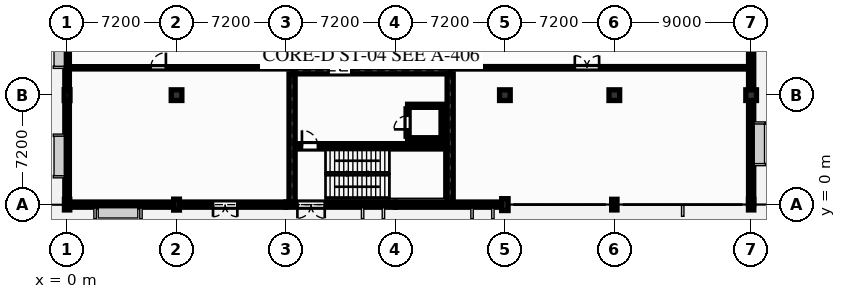
"""IFC4 building model, lengths in metres.
Left out: names, types, materials, properties, quantities, classifications, styles, units other than length and angle.
Written with IfcOpenShell. Run it as: python <this file> out.ifc"""

import sys

from ifc_helpers import new_model, si_unit, direction, frame, frame_2d, origin, origin_with_axes, origin_2d, place, context, subcontext, project, spatial, rectangle, extrude, element, fill, save


model = new_model("IFC4")
c1 = context("Model", 3, precision=1e-05, world=origin(), true_north=direction((0.0, 1.0)))
c2 = subcontext(c1, "Body", "Model", "MODEL_VIEW")
j1 = project(units=[si_unit("LENGTHUNIT", "METRE"), si_unit("PLANEANGLEUNIT", "RADIAN")], contexts=[c1])
p1 = place(None, origin())
s1 = spatial("IfcSite", under=j1, at=p1, CompositionType="ELEMENT")
p2 = place(p1, origin())
s2 = spatial("IfcBuilding", under=s1, at=p2, CompositionType="ELEMENT")
p3 = place(p2, origin())
s3 = spatial("IfcBuildingStorey", under=s2, at=p3, CompositionType="ELEMENT", Elevation=0.0)
p4 = place(p3, frame((0.0, 0.0, 0.0), z_axis=(0.0, 0.0, 1.0), x_axis=(0.0, 1.0, 0.0)))
e1 = element("IfcColumn", 1, at=p4, inside=s3, PredefinedType="PILASTER", context=c2, shape_type="SweptSolid", body=[
    extrude(rectangle(XDim=0.35, YDim=0.7, at=origin_2d()), origin(), (0.0, 0.0, 1.0), 5.1),
])
for number, where, z_axis, x_axis in (
    (2, (0.0, 7.2, 0.0), (0.0, 0.0, 1.0), (1.0, 0.0, 0.0)),
    (3, (7.2, 0.0, 0.0), (0.0, 0.0, 1.0), (0.0, 1.0, 0.0)),
):
    element("IfcColumn", number, at=place(p3, frame(where, z_axis=z_axis, x_axis=x_axis)), inside=s3, PredefinedType="PILASTER", context=c2, shape_type="SweptSolid", body=[
        extrude(rectangle(XDim=0.38, YDim=0.72, at=origin_2d()), origin(), (0.0, 0.0, 1.0), 5.1),
    ])
p5 = place(p3, frame((7.2, 7.2, 0.0), z_axis=(0.0, 0.0, 1.0), x_axis=(1.0, 0.0, 0.0)))
e4 = element("IfcColumn", 4, at=p5, inside=s3, PredefinedType="COLUMN", context=c2, shape_type="SweptSolid", body=[
    extrude(rectangle(XDim=0.7, YDim=0.7, at=origin_2d()), origin(), (0.0, 0.0, 1.0), 5.1),
])
p6 = place(p3, frame((28.8, 0.0, 0.0), z_axis=(0.0, 0.0, 1.0), x_axis=(0.0, 1.0, 0.0)))
e5 = element("IfcColumn", 5, at=p6, inside=s3, PredefinedType="PILASTER", context=c2, shape_type="SweptSolid", body=[
    extrude(rectangle(XDim=0.42, YDim=0.78, at=origin_2d()), origin(), (0.0, 0.0, 1.0), 5.1),
])
p7 = place(p3, frame((28.8, 7.2, 0.0), z_axis=(0.0, 0.0, 1.0), x_axis=(1.0, 0.0, 0.0)))
e6 = element("IfcColumn", 6, at=p7, inside=s3, PredefinedType="COLUMN", context=c2, shape_type="SweptSolid", body=[
    extrude(rectangle(XDim=0.7, YDim=0.7, at=origin_2d()), origin(), (0.0, 0.0, 1.0), 5.1),
])
p8 = place(p3, frame((36.0, 0.0, 0.0), z_axis=(0.0, 0.0, 1.0), x_axis=(0.0, 1.0, 0.0)))
e7 = element("IfcColumn", 7, at=p8, inside=s3, PredefinedType="PILASTER", context=c2, shape_type="SweptSolid", body=[
    extrude(rectangle(XDim=0.35, YDim=0.7, at=origin_2d()), origin(), (0.0, 0.0, 1.0), 5.1),
])
p9 = place(p3, frame((36.0, 7.2, 0.0), z_axis=(0.0, 0.0, 1.0), x_axis=(1.0, 0.0, 0.0)))
e8 = element("IfcColumn", 8, at=p9, inside=s3, PredefinedType="COLUMN", context=c2, shape_type="SweptSolid", body=[
    extrude(rectangle(XDim=0.7, YDim=0.7, at=origin_2d()), origin(), (0.0, 0.0, 1.0), 5.1),
])
p10 = place(p3, frame((45.0, 0.0, 0.0), z_axis=(0.0, 0.0, 1.0), x_axis=(0.0, 1.0, 0.0)))
e9 = element("IfcColumn", 9, at=p10, inside=s3, PredefinedType="PILASTER", context=c2, shape_type="SweptSolid", body=[
    extrude(rectangle(XDim=0.35, YDim=0.7, at=origin_2d()), origin(), (0.0, 0.0, 1.0), 5.1),
])
p11 = place(p3, frame((45.0, 7.2, 0.0), z_axis=(0.0, 0.0, 1.0), x_axis=(1.0, 0.0, 0.0)))
e10 = element("IfcColumn", 10, at=p11, inside=s3, PredefinedType="COLUMN", context=c2, shape_type="SweptSolid", body=[
    extrude(rectangle(XDim=0.7, YDim=0.7, at=origin_2d()), origin(), (0.0, 0.0, 1.0), 5.1),
])
p12 = place(p3, origin_with_axes())
e11 = element("IfcWall", 11, at=p12, inside=s3, PredefinedType="SOLIDWALL", context=c2, shape_type="SweptSolid", body=[
    extrude(rectangle(XDim=7.2, YDim=0.34, at=frame_2d((3.6, 0.0))), origin(), (0.0, 0.0, 1.0), 4.8),
])
p13 = place(p12, frame((2.0, 0.0, 0.85)))
e12 = element("IfcOpeningElement", 12, at=p13, cuts=e11, PredefinedType="OPENING", context=c2, shape_type="SweptSolid", body=[
    extrude(rectangle(XDim=2.7, YDim=2.6, at=frame_2d((1.35, 1.3))), frame((0.0, 0.18, 0.0), z_axis=(0.0, -1.0, 0.0), x_axis=(1.0, 0.0, 0.0)), (0.0, 0.0, 1.0), 0.36),
])
p14 = place(p3, frame((7.2, 0.0, 0.0), z_axis=(0.0, 0.0, 1.0), x_axis=(1.0, 0.0, 0.0)))
e13 = element("IfcWall", 13, at=p14, inside=s3, PredefinedType="SOLIDWALL", context=c2, shape_type="SweptSolid", body=[
    extrude(rectangle(XDim=7.2, YDim=0.34, at=frame_2d((3.6, 0.0))), origin(), (0.0, 0.0, 1.0), 4.8),
])
p15 = place(p14, frame((2.4, 0.0, 0.0)))
e14 = element("IfcOpeningElement", 14, at=p15, cuts=e13, PredefinedType="OPENING", context=c2, shape_type="SweptSolid", body=[
    extrude(rectangle(XDim=1.6, YDim=2.4, at=frame_2d((0.8, 1.2))), frame((0.0, 0.18, 0.0), z_axis=(0.0, -1.0, 0.0), x_axis=(1.0, 0.0, 0.0)), (0.0, 0.0, 1.0), 0.36),
])
p16 = place(p3, frame((14.4, 0.0, 0.0), z_axis=(0.0, 0.0, 1.0), x_axis=(1.0, 0.0, 0.0)))
e15 = element("IfcWall", 15, at=p16, inside=s3, PredefinedType="SOLIDWALL", context=c2, shape_type="SweptSolid", body=[
    extrude(rectangle(XDim=7.2, YDim=0.34, at=frame_2d((3.6, 0.0))), origin(), (0.0, 0.0, 1.0), 4.8),
])
p17 = place(p16, frame((0.75, 0.0, 0.0)))
e16 = element("IfcOpeningElement", 16, at=p17, cuts=e15, PredefinedType="OPENING", context=c2, shape_type="SweptSolid", body=[
    extrude(rectangle(XDim=1.8, YDim=2.4, at=frame_2d((0.9, 1.2))), frame((0.0, 0.18, 0.0), z_axis=(0.0, -1.0, 0.0), x_axis=(1.0, 0.0, 0.0)), (0.0, 0.0, 1.0), 0.36),
])
p18 = place(p16, frame((5.2, 0.0, 1.05)))
e17 = element("IfcOpeningElement", 17, at=p18, cuts=e15, PredefinedType="OPENING", context=c2, shape_type="SweptSolid", body=[
    extrude(rectangle(XDim=1.05, YDim=1.75, at=frame_2d((0.525, 0.875))), frame((0.0, 0.18, 0.0), z_axis=(0.0, -1.0, 0.0), x_axis=(1.0, 0.0, 0.0)), (0.0, 0.0, 1.0), 0.36),
])
p19 = place(p3, frame((21.6, 0.0, 0.0), z_axis=(0.0, 0.0, 1.0), x_axis=(1.0, 0.0, 0.0)))
e18 = element("IfcWall", 18, at=p19, inside=s3, PredefinedType="SOLIDWALL", context=c2, shape_type="SweptSolid", body=[
    extrude(rectangle(XDim=7.2, YDim=0.34, at=frame_2d((3.6, 0.0))), origin(), (0.0, 0.0, 1.0), 4.8),
])
p20 = place(p19, frame((5.2, 0.0, 1.05)))
e19 = element("IfcOpeningElement", 19, at=p20, cuts=e18, PredefinedType="OPENING", context=c2, shape_type="SweptSolid", body=[
    extrude(rectangle(XDim=1.05, YDim=1.75, at=frame_2d((0.525, 0.875))), frame((0.0, 0.18, 0.0), z_axis=(0.0, -1.0, 0.0), x_axis=(1.0, 0.0, 0.0)), (0.0, 0.0, 1.0), 0.36),
])
p21 = place(p3, frame((0.0, 0.0, 0.0), z_axis=(0.0, 0.0, 1.0), x_axis=(0.0, 1.0, 0.0)))
e20 = element("IfcWall", 20, at=p21, inside=s3, PredefinedType="SOLIDWALL", context=c2, shape_type="SweptSolid", body=[
    extrude(rectangle(XDim=7.2, YDim=0.3, at=frame_2d((3.6, 0.0))), origin(), (0.0, 0.0, 1.0), 4.115),
])
p22 = place(p21, frame((2.0, 0.0, 0.9)))
e21 = element("IfcOpeningElement", 21, at=p22, cuts=e20, PredefinedType="OPENING", context=c2, shape_type="SweptSolid", body=[
    extrude(rectangle(XDim=2.4, YDim=2.4, at=frame_2d((1.2, 1.2))), frame((0.0, 0.16, 0.0), z_axis=(0.0, -1.0, 0.0), x_axis=(1.0, 0.0, 0.0)), (0.0, 0.0, 1.0), 0.32),
])
p23 = place(p3, frame((0.0, 7.2, 0.0), z_axis=(0.0, 0.0, 1.0), x_axis=(0.0, 1.0, 0.0)))
e22 = element("IfcWall", 22, at=p23, inside=s3, PredefinedType="SOLIDWALL", context=c2, shape_type="SweptSolid", body=[
    extrude(rectangle(XDim=7.2, YDim=0.3, at=frame_2d((3.6, 0.0))), origin(), (0.0, 0.0, 1.0), 4.115),
])
p24 = place(p23, frame((4.2, 0.0, 0.9)))
e23 = element("IfcOpeningElement", 23, at=p24, cuts=e22, PredefinedType="OPENING", context=c2, shape_type="SweptSolid", body=[
    extrude(rectangle(XDim=2.4, YDim=2.4, at=frame_2d((1.2, 1.2))), frame((0.0, 0.16, 0.0), z_axis=(0.0, -1.0, 0.0), x_axis=(1.0, 0.0, 0.0)), (0.0, 0.0, 1.0), 0.32),
])
p25 = place(p3, frame((45.0, 0.0, 0.0), z_axis=(0.0, 0.0, 1.0), x_axis=(0.0, 1.0, 0.0)))
e24 = element("IfcWall", 24, at=p25, inside=s3, PredefinedType="SOLIDWALL", context=c2, shape_type="SweptSolid", body=[
    extrude(rectangle(XDim=28.8, YDim=0.34, at=frame_2d((14.4, 0.0))), origin(), (0.0, 0.0, 1.0), 4.8),
])
p26 = place(p25, frame((18.5, 0.0, 0.0)))
e25 = element("IfcOpeningElement", 25, at=p26, cuts=e24, PredefinedType="OPENING", context=c2, shape_type="SweptSolid", body=[
    extrude(rectangle(XDim=1.6, YDim=2.4, at=frame_2d((0.8, 1.2))), frame((0.0, 0.18, 0.0), z_axis=(0.0, -1.0, 0.0), x_axis=(1.0, 0.0, 0.0)), (0.0, 0.0, 1.0), 0.36),
])
p27 = place(p25, frame((2.8, 0.0, 0.9)))
e26 = element("IfcOpeningElement", 26, at=p27, cuts=e24, PredefinedType="OPENING", context=c2, shape_type="SweptSolid", body=[
    extrude(rectangle(XDim=2.4, YDim=2.4, at=frame_2d((1.2, 1.2))), frame((0.0, 0.18, 0.0), z_axis=(0.0, -1.0, 0.0), x_axis=(1.0, 0.0, 0.0)), (0.0, 0.0, 1.0), 0.36),
])
p28 = place(p25, frame((15.2, 0.0, 0.9)))
e27 = element("IfcOpeningElement", 27, at=p28, cuts=e24, PredefinedType="OPENING", context=c2, shape_type="SweptSolid", body=[
    extrude(rectangle(XDim=1.6, YDim=2.05, at=frame_2d((0.8, 1.025))), frame((0.0, 0.18, 0.0), z_axis=(0.0, -1.0, 0.0), x_axis=(1.0, 0.0, 0.0)), (0.0, 0.0, 1.0), 0.36),
])
p29 = place(p3, frame((14.8, 8.8, 0.0), z_axis=(0.0, 0.0, 1.0), x_axis=(1.0, 0.0, 0.0)))
e28 = element("IfcWall", 28, at=p29, inside=s3, PredefinedType="SHEAR", context=c2, shape_type="SweptSolid", body=[
    extrude(rectangle(XDim=10.4, YDim=0.4, at=frame_2d((5.2, 0.0))), origin(), (0.0, 0.0, 1.0), 4.8),
])
p30 = place(p29, frame((2.4, 0.0, 0.0)))
e29 = element("IfcOpeningElement", 29, at=p30, cuts=e28, PredefinedType="OPENING", context=c2, shape_type="SweptSolid", body=[
    extrude(rectangle(XDim=1.5, YDim=2.2, at=frame_2d((0.75, 1.1))), frame((0.0, 0.21, 0.0), z_axis=(0.0, -1.0, 0.0), x_axis=(1.0, 0.0, 0.0)), (0.0, 0.0, 1.0), 0.42),
])
for number, where, z_axis, x_axis in (
    (30, (14.8, 0.17, 0.0), (0.0, 0.0, 1.0), (0.0, 1.0, 0.0)),
    (31, (25.2, 0.17, 0.0), (0.0, 0.0, 1.0), (0.0, 1.0, 0.0)),
):
    element("IfcWall", number, at=place(p3, frame(where, z_axis=z_axis, x_axis=x_axis)), inside=s3, PredefinedType="SHEAR", context=c2, shape_type="SweptSolid", body=[
        extrude(rectangle(XDim=8.43, YDim=0.4, at=frame_2d((4.215, 0.0))), origin(), (0.0, 0.0, 1.0), 4.8),
    ])
p31 = place(p3, frame((15.0, 3.835, 0.0), z_axis=(0.0, 0.0, 1.0), x_axis=(1.0, 0.0, 0.0)))
e32 = element("IfcWall", 32, at=p31, inside=s3, PredefinedType="SHEAR", context=c2, shape_type="SweptSolid", body=[
    extrude(rectangle(XDim=10.0, YDim=0.35, at=frame_2d((5.0, 0.0))), origin(), (0.0, 0.0, 1.0), 4.8),
])
p32 = place(p31, frame((0.45, 0.0, 0.0)))
e33 = element("IfcOpeningElement", 33, at=p32, cuts=e32, PredefinedType="OPENING", context=c2, shape_type="SweptSolid", body=[
    extrude(rectangle(XDim=1.05, YDim=2.2, at=frame_2d((0.525, 1.1))), frame((0.0, 0.185, 0.0), z_axis=(0.0, -1.0, 0.0), x_axis=(1.0, 0.0, 0.0)), (0.0, 0.0, 1.0), 0.37),
])
for number, where, z_axis, x_axis in (
    (34, (22.4, 4.3, 0.0), (0.0, 0.0, 1.0), (1.0, 0.0, 0.0)),
    (35, (22.4, 6.5, 0.0), (0.0, 0.0, 1.0), (1.0, 0.0, 0.0)),
):
    element("IfcWall", number, at=place(p3, frame(where, z_axis=z_axis, x_axis=x_axis)), inside=s3, PredefinedType="PARTITIONING", context=c2, shape_type="SweptSolid", body=[
        extrude(rectangle(XDim=2.3, YDim=0.2, at=frame_2d((1.15, 0.0))), origin(), (0.0, 0.0, 1.0), 4.8),
    ])
p33 = place(p3, frame((22.4, 4.5, 0.0), z_axis=(0.0, 0.0, 1.0), x_axis=(0.0, 1.0, 0.0)))
e36 = element("IfcWall", 36, at=p33, inside=s3, PredefinedType="PARTITIONING", context=c2, shape_type="SweptSolid", body=[
    extrude(rectangle(XDim=1.8, YDim=0.2, at=frame_2d((0.9, 0.0))), origin(), (0.0, 0.0, 1.0), 4.8),
])
p34 = place(p33, frame((0.45, 0.0, 0.0)))
e37 = element("IfcOpeningElement", 37, at=p34, cuts=e36, PredefinedType="OPENING", context=c2, shape_type="SweptSolid", body=[
    extrude(rectangle(XDim=0.9, YDim=2.1, at=frame_2d((0.45, 1.05))), frame((0.0, 0.11, 0.0), z_axis=(0.0, -1.0, 0.0), x_axis=(1.0, 0.0, 0.0)), (0.0, 0.0, 1.0), 0.22),
])
p35 = place(p3, frame((24.7, 4.5, 0.0), z_axis=(0.0, 0.0, 1.0), x_axis=(0.0, 1.0, 0.0)))
e38 = element("IfcWall", 38, at=p35, inside=s3, PredefinedType="PARTITIONING", context=c2, shape_type="SweptSolid", body=[
    extrude(rectangle(XDim=1.8, YDim=0.2, at=frame_2d((0.9, 0.0))), origin(), (0.0, 0.0, 1.0), 4.8),
])
p36 = place(p3, frame((25.4, 9.0, 0.0), z_axis=(0.0, 0.0, 1.0), x_axis=(1.0, 0.0, 0.0)))
e39 = element("IfcWall", 39, at=p36, inside=s3, PredefinedType="PARTITIONING", context=c2, shape_type="SweptSolid", body=[
    extrude(rectangle(XDim=19.6, YDim=0.16, at=frame_2d((9.8, 0.0))), origin(), (0.0, 0.0, 1.0), 4.8),
])
p37 = place(p36, frame((8.0, 0.0, 0.0)))
e40 = element("IfcOpeningElement", 40, at=p37, cuts=e39, PredefinedType="OPENING", context=c2, shape_type="SweptSolid", body=[
    extrude(rectangle(XDim=1.6, YDim=2.2, at=frame_2d((0.8, 1.1))), frame((0.0, 0.09, 0.0), z_axis=(0.0, -1.0, 0.0), x_axis=(1.0, 0.0, 0.0)), (0.0, 0.0, 1.0), 0.18),
])
p38 = place(p3, frame((0.0, 9.0, 0.0), z_axis=(0.0, 0.0, 1.0), x_axis=(1.0, 0.0, 0.0)))
e41 = element("IfcWall", 41, at=p38, inside=s3, PredefinedType="PARTITIONING", context=c2, shape_type="SweptSolid", body=[
    extrude(rectangle(XDim=14.6, YDim=0.15, at=frame_2d((7.3, 0.0))), origin(), (0.0, 0.0, 1.0), 4.8),
])
p39 = place(p38, frame((5.5, 0.0, 0.0)))
e42 = element("IfcOpeningElement", 42, at=p39, cuts=e41, PredefinedType="OPENING", context=c2, shape_type="SweptSolid", body=[
    extrude(rectangle(XDim=1.0, YDim=2.15, at=frame_2d((0.5, 1.075))), frame((0.0, 0.085, 0.0), z_axis=(0.0, -1.0, 0.0), x_axis=(1.0, 0.0, 0.0)), (0.0, 0.0, 1.0), 0.17),
])
p40 = place(p13, origin())
e43 = element("IfcWindow", 43, at=p40, inside=s3, PartitioningType="SINGLE_PANEL", PredefinedType="WINDOW", context=c2, shape_type="SweptSolid", body=[
    extrude(rectangle(XDim=2.7, YDim=2.6, at=frame_2d((1.35, 1.3))), frame((0.0, 0.03, 0.0), z_axis=(0.0, -1.0, 0.0), x_axis=(1.0, 0.0, 0.0)), (0.0, 0.0, 1.0), 0.06),
])
fill(e12, e43)
p41 = place(p15, frame((1.6, 0.0, 0.0), z_axis=(0.0, 0.0, 1.0), x_axis=(-1.0, 0.0, 0.0)))
e44 = element("IfcDoor", 44, at=p41, inside=s3, OperationType="DOUBLE_DOOR_SINGLE_SWING", PredefinedType="DOOR", context=c2, shape_type="SweptSolid", body=[
    extrude(rectangle(XDim=1.6, YDim=2.4, at=frame_2d((0.8, 1.2))), frame((0.0, 0.025, 0.0), z_axis=(0.0, -1.0, 0.0), x_axis=(1.0, 0.0, 0.0)), (0.0, 0.0, 1.0), 0.05),
])
fill(e14, e44)
p42 = place(p17, frame((1.8, 0.0, 0.0), z_axis=(0.0, 0.0, 1.0), x_axis=(-1.0, 0.0, 0.0)))
e45 = element("IfcDoor", 45, at=p42, inside=s3, OperationType="DOUBLE_DOOR_SINGLE_SWING", PredefinedType="DOOR", context=c2, shape_type="SweptSolid", body=[
    extrude(rectangle(XDim=1.8, YDim=2.4, at=frame_2d((0.9, 1.2))), frame((0.0, 0.025, 0.0), z_axis=(0.0, -1.0, 0.0), x_axis=(1.0, 0.0, 0.0)), (0.0, 0.0, 1.0), 0.05),
])
fill(e16, e45)
p43 = place(p18, origin())
e46 = element("IfcWindow", 46, at=p43, inside=s3, PartitioningType="SINGLE_PANEL", PredefinedType="WINDOW", context=c2, shape_type="SweptSolid", body=[
    extrude(rectangle(XDim=1.05, YDim=1.75, at=frame_2d((0.525, 0.875))), frame((0.0, 0.03, 0.0), z_axis=(0.0, -1.0, 0.0), x_axis=(1.0, 0.0, 0.0)), (0.0, 0.0, 1.0), 0.06),
])
fill(e17, e46)
p44 = place(p20, origin())
e47 = element("IfcWindow", 47, at=p44, inside=s3, PartitioningType="SINGLE_PANEL", PredefinedType="WINDOW", context=c2, shape_type="SweptSolid", body=[
    extrude(rectangle(XDim=1.05, YDim=1.75, at=frame_2d((0.525, 0.875))), frame((0.0, 0.03, 0.0), z_axis=(0.0, -1.0, 0.0), x_axis=(1.0, 0.0, 0.0)), (0.0, 0.0, 1.0), 0.06),
])
fill(e19, e47)
p45 = place(p22, origin())
e48 = element("IfcWindow", 48, at=p45, inside=s3, PartitioningType="SINGLE_PANEL", PredefinedType="WINDOW", context=c2, shape_type="SweptSolid", body=[
    extrude(rectangle(XDim=2.4, YDim=2.4, at=frame_2d((1.2, 1.2))), frame((0.0, 0.03, 0.0), z_axis=(0.0, -1.0, 0.0), x_axis=(1.0, 0.0, 0.0)), (0.0, 0.0, 1.0), 0.06),
])
fill(e21, e48)
p46 = place(p27, origin())
e49 = element("IfcWindow", 49, at=p46, inside=s3, PartitioningType="SINGLE_PANEL", PredefinedType="WINDOW", context=c2, shape_type="SweptSolid", body=[
    extrude(rectangle(XDim=2.4, YDim=2.4, at=frame_2d((1.2, 1.2))), frame((0.0, 0.03, 0.0), z_axis=(0.0, -1.0, 0.0), x_axis=(1.0, 0.0, 0.0)), (0.0, 0.0, 1.0), 0.06),
])
fill(e26, e49)
p47 = place(p30, origin())
e50 = element("IfcDoor", 50, at=p47, inside=s3, OperationType="DOUBLE_DOOR_SINGLE_SWING", PredefinedType="DOOR", context=c2, shape_type="SweptSolid", body=[
    extrude(rectangle(XDim=1.5, YDim=2.2, at=frame_2d((0.75, 1.1))), frame((0.0, 0.025, 0.0), z_axis=(0.0, -1.0, 0.0), x_axis=(1.0, 0.0, 0.0)), (0.0, 0.0, 1.0), 0.05),
])
fill(e29, e50)
p48 = place(p32, origin())
e51 = element("IfcDoor", 51, at=p48, inside=s3, OperationType="SINGLE_SWING_LEFT", PredefinedType="DOOR", context=c2, shape_type="SweptSolid", body=[
    extrude(rectangle(XDim=1.05, YDim=2.2, at=frame_2d((0.525, 1.1))), frame((0.0, 0.025, 0.0), z_axis=(0.0, -1.0, 0.0), x_axis=(1.0, 0.0, 0.0)), (0.0, 0.0, 1.0), 0.05),
])
fill(e33, e51)
p49 = place(p34, origin())
e52 = element("IfcDoor", 52, at=p49, inside=s3, OperationType="SINGLE_SWING_LEFT", PredefinedType="DOOR", context=c2, shape_type="SweptSolid", body=[
    extrude(rectangle(XDim=0.9, YDim=2.1, at=frame_2d((0.45, 1.05))), frame((0.0, 0.025, 0.0), z_axis=(0.0, -1.0, 0.0), x_axis=(1.0, 0.0, 0.0)), (0.0, 0.0, 1.0), 0.05),
])
fill(e37, e52)
p50 = place(p37, origin())
e53 = element("IfcDoor", 53, at=p50, inside=s3, OperationType="DOUBLE_DOOR_SINGLE_SWING", PredefinedType="DOOR", context=c2, shape_type="SweptSolid", body=[
    extrude(rectangle(XDim=1.6, YDim=2.2, at=frame_2d((0.8, 1.1))), frame((0.0, 0.025, 0.0), z_axis=(0.0, -1.0, 0.0), x_axis=(1.0, 0.0, 0.0)), (0.0, 0.0, 1.0), 0.05),
])
fill(e40, e53)
p51 = place(p39, origin())
e54 = element("IfcDoor", 54, at=p51, inside=s3, OperationType="SINGLE_SWING_RIGHT", PredefinedType="DOOR", context=c2, shape_type="SweptSolid", body=[
    extrude(rectangle(XDim=1.0, YDim=2.15, at=frame_2d((0.5, 1.075))), frame((0.0, 0.025, 0.0), z_axis=(0.0, -1.0, 0.0), x_axis=(1.0, 0.0, 0.0)), (0.0, 0.0, 1.0), 0.05),
])
fill(e42, e54)
save(model, sys.argv[1])
